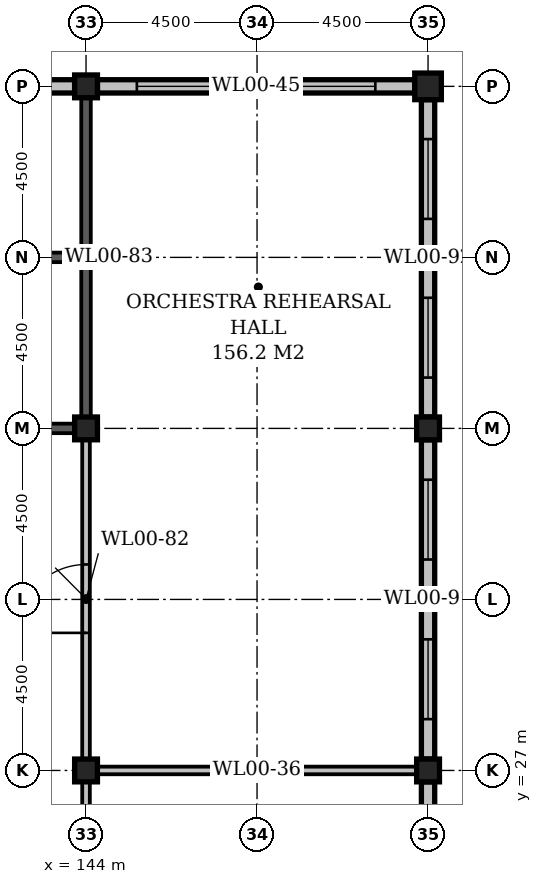
"""IFC4 building model, lengths in metres.
Left out: names, types, materials, properties, quantities, classifications, styles, units other than length and angle.
Written with IfcOpenShell. Run it as: python <this file> out.ifc"""

import sys

from ifc_helpers import new_model, si_unit, direction, frame, frame_2d, origin, origin_2d, place, context, subcontext, project, spatial, rectangle, extrude, element, fill, save


model = new_model("IFC4")
c1 = context("Model", 3, precision=1e-05, world=origin(), true_north=direction((0.0, 1.0)))
c2 = subcontext(c1, "Body", "Model", "MODEL_VIEW")
j1 = project(units=[si_unit("LENGTHUNIT", "METRE"), si_unit("PLANEANGLEUNIT", "RADIAN")], contexts=[c1])
p1 = place(None, origin())
s1 = spatial("IfcSite", under=j1, at=p1, CompositionType="ELEMENT")
p2 = place(p1, origin())
s2 = spatial("IfcBuilding", under=s1, at=p2, CompositionType="ELEMENT")
p3 = place(p2, origin())
s3 = spatial("IfcBuildingStorey", under=s2, at=p3, CompositionType="ELEMENT", Elevation=0.0)
for number, where, z_axis, x_axis in (
    (1, (144.0, 27.0, 0.0), (0.0, 0.0, 1.0), (1.0, 0.0, 0.0)),
    (2, (144.0, 36.0, 0.0), (0.0, 0.0, 1.0), (1.0, 0.0, 0.0)),
    (3, (144.0, 45.0, 0.0), (0.0, 0.0, 1.0), (1.0, 0.0, 0.0)),
    (4, (153.0, 27.0, 0.0), (0.0, 0.0, 1.0), (1.0, 0.0, 0.0)),
    (5, (153.0, 36.0, 0.0), (0.0, 0.0, 1.0), (1.0, 0.0, 0.0)),
):
    element("IfcColumn", number, at=place(p3, frame(where, z_axis=z_axis, x_axis=x_axis)), inside=s3, PredefinedType="COLUMN", context=c2, shape_type="SweptSolid", body=[
        extrude(rectangle(XDim=0.6, YDim=0.6, at=origin_2d()), origin(), (0.0, 0.0, 1.0), 8.7),
    ])
p4 = place(p3, frame((153.0, 45.0, 0.0), z_axis=(0.0, 0.0, 1.0), x_axis=(1.0, 0.0, 0.0)))
e6 = element("IfcColumn", 6, at=p4, inside=s3, PredefinedType="COLUMN", context=c2, shape_type="SweptSolid", body=[
    extrude(rectangle(XDim=0.7, YDim=0.7, at=origin_2d()), origin(), (0.0, 0.0, 1.0), 8.7),
])
p5 = place(p3, frame((144.3, 27.0, 0.0), z_axis=(0.0, 0.0, 1.0), x_axis=(1.0, 0.0, 0.0)))
e7 = element("IfcWall", 7, at=p5, inside=s3, PredefinedType="STANDARD", context=c2, shape_type="SweptSolid", body=[
    extrude(rectangle(XDim=8.4, YDim=0.2, at=frame_2d((4.2, 0.0))), origin(), (0.0, 0.0, 1.0), 8.7),
])
p6 = place(p3, frame((139.5, 36.0, 0.0), z_axis=(0.0, 0.0, 1.0), x_axis=(1.0, 0.0, 0.0)))
e8 = element("IfcWall", 8, at=p6, inside=s3, PredefinedType="STANDARD", context=c2, shape_type="SweptSolid", body=[
    extrude(rectangle(XDim=4.2, YDim=0.25, at=frame_2d((2.1, 0.0))), origin(), (0.0, 0.0, 1.0), 8.7),
])
p7 = place(p6, frame((1.57, 0.0, 0.0)))
e9 = element("IfcOpeningElement", 9, at=p7, cuts=e8, PredefinedType="OPENING", context=c2, shape_type="SweptSolid", body=[
    extrude(rectangle(XDim=1.4, YDim=2.1, at=frame_2d((0.7, 1.05))), frame((0.0, 0.137, 0.0), z_axis=(0.0, -1.0, 0.0), x_axis=(1.0, 0.0, 0.0)), (0.0, 0.0, 1.0), 0.274),
])
p8 = place(p3, frame((139.625, 40.5, 0.0), z_axis=(0.0, 0.0, 1.0), x_axis=(1.0, 0.0, 0.0)))
e10 = element("IfcWall", 10, at=p8, inside=s3, PredefinedType="STANDARD", context=c2, shape_type="SweptSolid", body=[
    extrude(rectangle(XDim=4.25, YDim=0.25, at=frame_2d((2.125, 0.0))), origin(), (0.0, 0.0, 1.0), 8.7),
])
p9 = place(p8, frame((1.42, 0.0, 0.0)))
e11 = element("IfcOpeningElement", 11, at=p9, cuts=e10, PredefinedType="OPENING", context=c2, shape_type="SweptSolid", body=[
    extrude(rectangle(XDim=1.4, YDim=2.1, at=frame_2d((0.7, 1.05))), frame((0.0, 0.137, 0.0), z_axis=(0.0, -1.0, 0.0), x_axis=(1.0, 0.0, 0.0)), (0.0, 0.0, 1.0), 0.274),
])
p10 = place(p3, frame((139.5, 45.0, 0.0), z_axis=(0.0, 0.0, 1.0), x_axis=(1.0, 0.0, 0.0)))
e12 = element("IfcWall", 12, at=p10, inside=s3, PredefinedType="STANDARD", context=c2, shape_type="SweptSolid", body=[
    extrude(rectangle(XDim=4.2, YDim=0.35, at=frame_2d((2.1, 0.0))), origin(), (0.0, 0.0, 1.0), 8.1),
])
p11 = place(p10, frame((1.57, 0.0, 0.0)))
e13 = element("IfcOpeningElement", 13, at=p11, cuts=e12, PredefinedType="OPENING", context=c2, shape_type="SweptSolid", body=[
    extrude(rectangle(XDim=1.4, YDim=2.1, at=frame_2d((0.7, 1.05))), frame((0.0, 0.187, 0.0), z_axis=(0.0, -1.0, 0.0), x_axis=(1.0, 0.0, 0.0)), (0.0, 0.0, 1.0), 0.374),
])
p12 = place(p3, frame((144.3, 45.0, 0.0), z_axis=(0.0, 0.0, 1.0), x_axis=(1.0, 0.0, 0.0)))
e14 = element("IfcWall", 14, at=p12, inside=s3, PredefinedType="STANDARD", context=c2, shape_type="SweptSolid", body=[
    extrude(rectangle(XDim=8.35, YDim=0.35, at=frame_2d((4.175, 0.0))), origin(), (0.0, 0.0, 1.0), 8.1),
])
p13 = place(p12, frame((1.038, 0.0, 1.2)))
e15 = element("IfcOpeningElement", 15, at=p13, cuts=e14, PredefinedType="OPENING", context=c2, shape_type="SweptSolid", body=[
    extrude(rectangle(XDim=2.1, YDim=2.4, at=frame_2d((1.05, 1.2))), frame((0.0, 0.187, 0.0), z_axis=(0.0, -1.0, 0.0), x_axis=(1.0, 0.0, 0.0)), (0.0, 0.0, 1.0), 0.374),
])
p14 = place(p12, frame((5.212, 0.0, 1.2)))
e16 = element("IfcOpeningElement", 16, at=p14, cuts=e14, PredefinedType="OPENING", context=c2, shape_type="SweptSolid", body=[
    extrude(rectangle(XDim=2.1, YDim=2.4, at=frame_2d((1.05, 1.2))), frame((0.0, 0.187, 0.0), z_axis=(0.0, -1.0, 0.0), x_axis=(1.0, 0.0, 0.0)), (0.0, 0.0, 1.0), 0.374),
])
p15 = place(p3, frame((144.0, 18.3, 0.0), z_axis=(0.0, 0.0, 1.0), x_axis=(0.0, 1.0, 0.0)))
e17 = element("IfcWall", 17, at=p15, inside=s3, PredefinedType="STANDARD", context=c2, shape_type="SweptSolid", body=[
    extrude(rectangle(XDim=8.4, YDim=0.2, at=frame_2d((4.2, 0.0))), origin(), (0.0, 0.0, 1.0), 8.7),
])
p16 = place(p15, frame((2.97, 0.0, 0.0)))
e18 = element("IfcOpeningElement", 18, at=p16, cuts=e17, PredefinedType="OPENING", context=c2, shape_type="SweptSolid", body=[
    extrude(rectangle(XDim=1.0, YDim=2.1, at=frame_2d((0.5, 1.05))), frame((0.0, 0.112, 0.0), z_axis=(0.0, -1.0, 0.0), x_axis=(1.0, 0.0, 0.0)), (0.0, 0.0, 1.0), 0.224),
])
p17 = place(p3, frame((144.0, 27.3, 0.0), z_axis=(0.0, 0.0, 1.0), x_axis=(0.0, 1.0, 0.0)))
e19 = element("IfcWall", 19, at=p17, inside=s3, PredefinedType="STANDARD", context=c2, shape_type="SweptSolid", body=[
    extrude(rectangle(XDim=8.4, YDim=0.2, at=frame_2d((4.2, 0.0))), origin(), (0.0, 0.0, 1.0), 8.7),
])
p18 = place(p17, frame((3.32, 0.0, 0.0)))
e20 = element("IfcOpeningElement", 20, at=p18, cuts=e19, PredefinedType="OPENING", context=c2, shape_type="SweptSolid", body=[
    extrude(rectangle(XDim=1.8, YDim=2.4, at=frame_2d((0.9, 1.2))), frame((0.0, 0.112, 0.0), z_axis=(0.0, -1.0, 0.0), x_axis=(1.0, 0.0, 0.0)), (0.0, 0.0, 1.0), 0.224),
])
p19 = place(p3, frame((144.0, 36.3, 0.0), z_axis=(0.0, 0.0, 1.0), x_axis=(0.0, 1.0, 0.0)))
e21 = element("IfcWall", 21, at=p19, inside=s3, PredefinedType="STANDARD", context=c2, shape_type="SweptSolid", body=[
    extrude(rectangle(XDim=8.4, YDim=0.25, at=frame_2d((4.2, 0.0))), origin(), (0.0, 0.0, 1.0), 8.7),
])
p20 = place(p3, frame((153.0, 18.3, 0.0), z_axis=(0.0, 0.0, 1.0), x_axis=(0.0, 1.0, 0.0)))
e22 = element("IfcWall", 22, at=p20, inside=s3, PredefinedType="STANDARD", context=c2, shape_type="SweptSolid", body=[
    extrude(rectangle(XDim=8.4, YDim=0.35, at=frame_2d((4.2, 0.0))), origin(), (0.0, 0.0, 1.0), 8.1),
])
p21 = place(p20, frame((1.05, 0.0, 1.2)))
e23 = element("IfcOpeningElement", 23, at=p21, cuts=e22, PredefinedType="OPENING", context=c2, shape_type="SweptSolid", body=[
    extrude(rectangle(XDim=2.1, YDim=2.4, at=frame_2d((1.05, 1.2))), frame((0.0, 0.187, 0.0), z_axis=(0.0, -1.0, 0.0), x_axis=(1.0, 0.0, 0.0)), (0.0, 0.0, 1.0), 0.374),
])
p22 = place(p20, frame((5.25, 0.0, 1.2)))
e24 = element("IfcOpeningElement", 24, at=p22, cuts=e22, PredefinedType="OPENING", context=c2, shape_type="SweptSolid", body=[
    extrude(rectangle(XDim=2.1, YDim=2.4, at=frame_2d((1.05, 1.2))), frame((0.0, 0.187, 0.0), z_axis=(0.0, -1.0, 0.0), x_axis=(1.0, 0.0, 0.0)), (0.0, 0.0, 1.0), 0.374),
])
p23 = place(p3, frame((153.0, 27.3, 0.0), z_axis=(0.0, 0.0, 1.0), x_axis=(0.0, 1.0, 0.0)))
e25 = element("IfcWall", 25, at=p23, inside=s3, PredefinedType="STANDARD", context=c2, shape_type="SweptSolid", body=[
    extrude(rectangle(XDim=8.4, YDim=0.35, at=frame_2d((4.2, 0.0))), origin(), (0.0, 0.0, 1.0), 8.1),
])
p24 = place(p23, frame((1.05, 0.0, 1.2)))
e26 = element("IfcOpeningElement", 26, at=p24, cuts=e25, PredefinedType="OPENING", context=c2, shape_type="SweptSolid", body=[
    extrude(rectangle(XDim=2.1, YDim=2.4, at=frame_2d((1.05, 1.2))), frame((0.0, 0.187, 0.0), z_axis=(0.0, -1.0, 0.0), x_axis=(1.0, 0.0, 0.0)), (0.0, 0.0, 1.0), 0.374),
])
p25 = place(p23, frame((5.25, 0.0, 1.2)))
e27 = element("IfcOpeningElement", 27, at=p25, cuts=e25, PredefinedType="OPENING", context=c2, shape_type="SweptSolid", body=[
    extrude(rectangle(XDim=2.1, YDim=2.4, at=frame_2d((1.05, 1.2))), frame((0.0, 0.187, 0.0), z_axis=(0.0, -1.0, 0.0), x_axis=(1.0, 0.0, 0.0)), (0.0, 0.0, 1.0), 0.374),
])
p26 = place(p3, frame((153.0, 36.3, 0.0), z_axis=(0.0, 0.0, 1.0), x_axis=(0.0, 1.0, 0.0)))
e28 = element("IfcWall", 28, at=p26, inside=s3, PredefinedType="STANDARD", context=c2, shape_type="SweptSolid", body=[
    extrude(rectangle(XDim=8.35, YDim=0.35, at=frame_2d((4.175, 0.0))), origin(), (0.0, 0.0, 1.0), 8.1),
])
p27 = place(p26, frame((1.038, 0.0, 1.2)))
e29 = element("IfcOpeningElement", 29, at=p27, cuts=e28, PredefinedType="OPENING", context=c2, shape_type="SweptSolid", body=[
    extrude(rectangle(XDim=2.1, YDim=2.4, at=frame_2d((1.05, 1.2))), frame((0.0, 0.187, 0.0), z_axis=(0.0, -1.0, 0.0), x_axis=(1.0, 0.0, 0.0)), (0.0, 0.0, 1.0), 0.374),
])
p28 = place(p26, frame((5.212, 0.0, 1.2)))
e30 = element("IfcOpeningElement", 30, at=p28, cuts=e28, PredefinedType="OPENING", context=c2, shape_type="SweptSolid", body=[
    extrude(rectangle(XDim=2.1, YDim=2.4, at=frame_2d((1.05, 1.2))), frame((0.0, 0.187, 0.0), z_axis=(0.0, -1.0, 0.0), x_axis=(1.0, 0.0, 0.0)), (0.0, 0.0, 1.0), 0.374),
])
p29 = place(p18, origin())
e31 = element("IfcDoor", 31, at=p29, inside=s3, OperationType="DOUBLE_DOOR_SINGLE_SWING", PredefinedType="DOOR", context=c2, shape_type="SweptSolid", body=[
    extrude(rectangle(XDim=1.8, YDim=2.4, at=frame_2d((0.9, 1.2))), frame((0.0, 0.025, 0.0), z_axis=(0.0, -1.0, 0.0), x_axis=(1.0, 0.0, 0.0)), (0.0, 0.0, 1.0), 0.05),
])
fill(e20, e31)
p30 = place(p13, origin())
e32 = element("IfcWindow", 32, at=p30, inside=s3, PartitioningType="SINGLE_PANEL", PredefinedType="WINDOW", context=c2, shape_type="SweptSolid", body=[
    extrude(rectangle(XDim=2.1, YDim=2.4, at=frame_2d((1.05, 1.2))), frame((0.0, 0.03, 0.0), z_axis=(0.0, -1.0, 0.0), x_axis=(1.0, 0.0, 0.0)), (0.0, 0.0, 1.0), 0.06),
])
fill(e15, e32)
p31 = place(p14, origin())
e33 = element("IfcWindow", 33, at=p31, inside=s3, PartitioningType="SINGLE_PANEL", PredefinedType="WINDOW", context=c2, shape_type="SweptSolid", body=[
    extrude(rectangle(XDim=2.1, YDim=2.4, at=frame_2d((1.05, 1.2))), frame((0.0, 0.03, 0.0), z_axis=(0.0, -1.0, 0.0), x_axis=(1.0, 0.0, 0.0)), (0.0, 0.0, 1.0), 0.06),
])
fill(e16, e33)
p32 = place(p24, origin())
e34 = element("IfcWindow", 34, at=p32, inside=s3, PartitioningType="SINGLE_PANEL", PredefinedType="WINDOW", context=c2, shape_type="SweptSolid", body=[
    extrude(rectangle(XDim=2.1, YDim=2.4, at=frame_2d((1.05, 1.2))), frame((0.0, 0.03, 0.0), z_axis=(0.0, -1.0, 0.0), x_axis=(1.0, 0.0, 0.0)), (0.0, 0.0, 1.0), 0.06),
])
fill(e26, e34)
p33 = place(p25, origin())
e35 = element("IfcWindow", 35, at=p33, inside=s3, PartitioningType="SINGLE_PANEL", PredefinedType="WINDOW", context=c2, shape_type="SweptSolid", body=[
    extrude(rectangle(XDim=2.1, YDim=2.4, at=frame_2d((1.05, 1.2))), frame((0.0, 0.03, 0.0), z_axis=(0.0, -1.0, 0.0), x_axis=(1.0, 0.0, 0.0)), (0.0, 0.0, 1.0), 0.06),
])
fill(e27, e35)
p34 = place(p27, origin())
e36 = element("IfcWindow", 36, at=p34, inside=s3, PartitioningType="SINGLE_PANEL", PredefinedType="WINDOW", context=c2, shape_type="SweptSolid", body=[
    extrude(rectangle(XDim=2.1, YDim=2.4, at=frame_2d((1.05, 1.2))), frame((0.0, 0.03, 0.0), z_axis=(0.0, -1.0, 0.0), x_axis=(1.0, 0.0, 0.0)), (0.0, 0.0, 1.0), 0.06),
])
fill(e29, e36)
p35 = place(p28, origin())
e37 = element("IfcWindow", 37, at=p35, inside=s3, PartitioningType="SINGLE_PANEL", PredefinedType="WINDOW", context=c2, shape_type="SweptSolid", body=[
    extrude(rectangle(XDim=2.1, YDim=2.4, at=frame_2d((1.05, 1.2))), frame((0.0, 0.03, 0.0), z_axis=(0.0, -1.0, 0.0), x_axis=(1.0, 0.0, 0.0)), (0.0, 0.0, 1.0), 0.06),
])
fill(e30, e37)
save(model, sys.argv[1])
